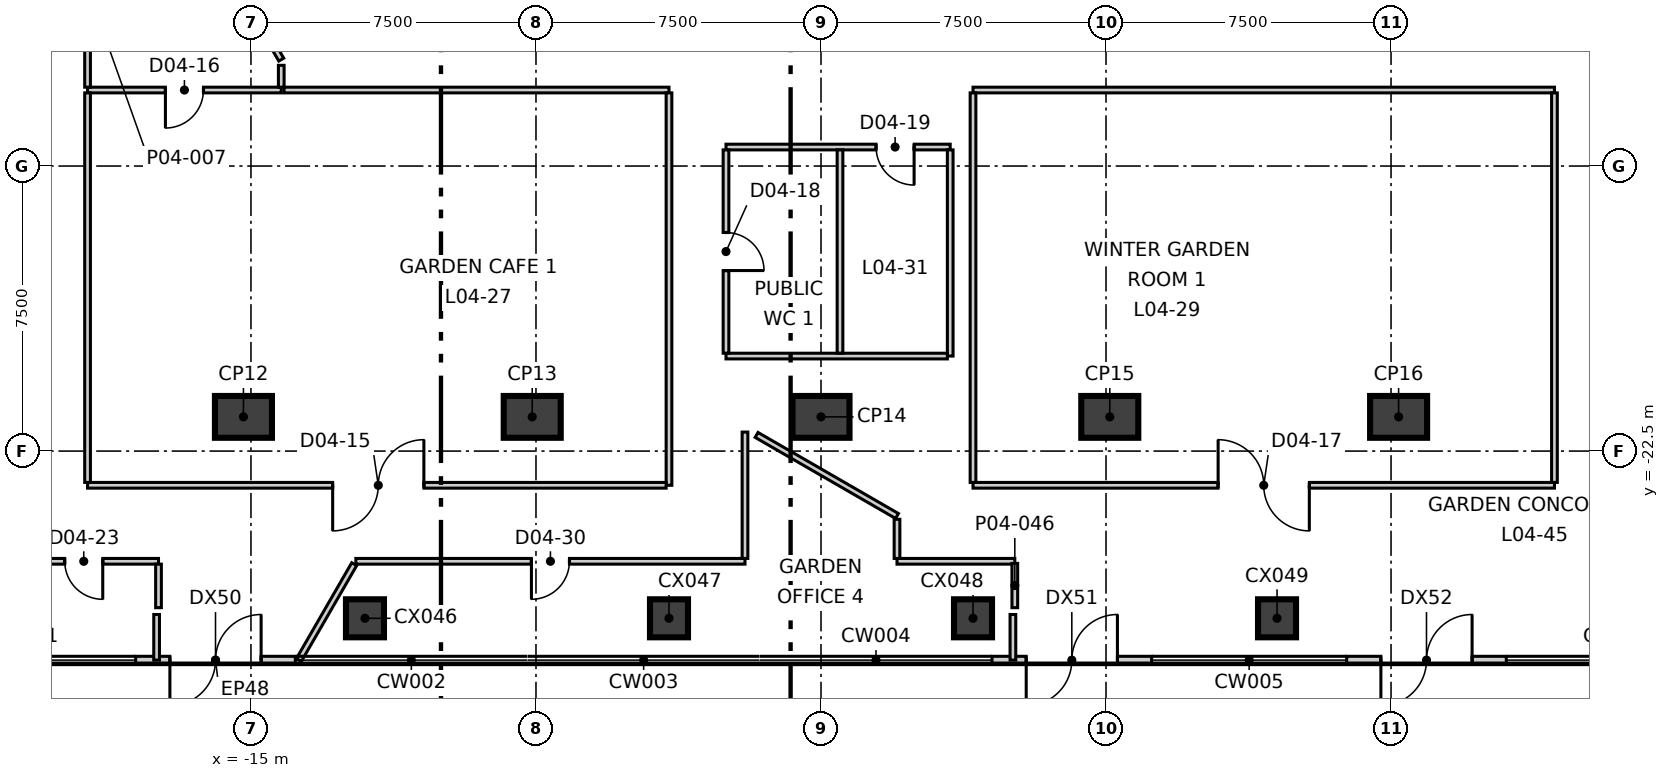
"""IFC4 building model, lengths in metres.
Left out: names, types, materials, properties, quantities, classifications, styles, units other than length and angle.
Written with IfcOpenShell. Run it as: python <this file> out.ifc"""

import sys

from ifc_helpers import new_model, si_unit, direction, frame, frame_2d, origin, origin_2d, place, context, subcontext, project, spatial, rectangle, extrude, element, fill, save


model = new_model("IFC4")
c1 = context("Model", 3, precision=1e-05, world=origin(), true_north=direction((0.0, 1.0)))
c2 = subcontext(c1, "Body", "Model", "MODEL_VIEW")
j1 = project(units=[si_unit("LENGTHUNIT", "METRE"), si_unit("PLANEANGLEUNIT", "RADIAN")], contexts=[c1])
p1 = place(None, origin())
s1 = spatial("IfcSite", under=j1, at=p1, CompositionType="ELEMENT")
p2 = place(p1, origin())
s2 = spatial("IfcBuilding", under=s1, at=p2, CompositionType="ELEMENT")
p3 = place(p2, frame((0.0, 0.0, 25.3)))
s3 = spatial("IfcBuildingStorey", under=s2, at=p3, CompositionType="ELEMENT", Elevation=25.3)
for number, where, z_axis, x_axis in (
    (1, (-15.198, -21.6, -0.4), (0.0, 0.0, 1.0), (1.0, 0.0, 0.0)),
    (2, (-7.599, -21.6, -0.4), (0.0, 0.0, 1.0), (1.0, 0.0, 0.0)),
    (3, (0.0, -21.6, -0.4), (0.0, 0.0, 1.0), (1.0, 0.0, 0.0)),
    (4, (7.599, -21.6, -0.4), (0.0, 0.0, 1.0), (1.0, 0.0, 0.0)),
    (5, (15.199, -21.6, -0.4), (0.0, 0.0, 1.0), (1.0, 0.0, 0.0)),
):
    element("IfcColumn", number, at=place(p3, frame(where, z_axis=z_axis, x_axis=x_axis)), inside=s3, PredefinedType="COLUMN", context=c2, shape_type="SweptSolid", body=[
        extrude(rectangle(XDim=1.5, YDim=1.1, at=origin_2d()), origin(), (0.0, 0.0, 1.0), 5.0),
    ])
for number, where, z_axis, x_axis in (
    (6, (-12.0, -26.9, -0.4), (0.0, 0.0, 1.0), (1.0, 0.0, 0.0)),
    (7, (-4.0, -26.9, -0.4), (0.0, 0.0, 1.0), (1.0, 0.0, 0.0)),
    (8, (4.0, -26.9, -0.4), (0.0, 0.0, 1.0), (1.0, 0.0, 0.0)),
    (9, (12.0, -26.9, -0.4), (0.0, 0.0, 1.0), (1.0, 0.0, 0.0)),
):
    element("IfcColumn", number, at=place(p3, frame(where, z_axis=z_axis, x_axis=x_axis)), inside=s3, PredefinedType="COLUMN", context=c2, shape_type="SweptSolid", body=[
        extrude(rectangle(XDim=1.0, YDim=1.0, at=origin_2d()), origin(), (0.0, 0.0, 1.0), 5.0),
    ])
p4 = place(p3, frame((-18.033, -28.0, 0.0), z_axis=(0.0, 0.0, 1.0), x_axis=(1.0, 0.0, 0.0)))
e10 = element("IfcWall", 10, at=p4, inside=s3, PredefinedType="ELEMENTEDWALL", context=c2, shape_type="SweptSolid", body=[
    extrude(rectangle(XDim=4.2, YDim=0.2, at=frame_2d((2.1, 0.0))), origin(), (0.0, 0.0, 1.0), 4.6),
])
p5 = place(p4, frame((0.9, 0.0, 0.0)))
e11 = element("IfcOpeningElement", 11, at=p5, cuts=e10, PredefinedType="OPENING", context=c2, shape_type="SweptSolid", body=[
    extrude(rectangle(XDim=2.4, YDim=2.4, at=frame_2d((1.2, 1.2))), frame((0.0, 0.11, 0.0), z_axis=(0.0, -1.0, 0.0), x_axis=(1.0, 0.0, 0.0)), (0.0, 0.0, 1.0), 0.22),
])
p6 = place(p3, frame((4.5, -28.0, 0.0), z_axis=(0.0, 0.0, 1.0), x_axis=(1.0, 0.0, 0.0)))
e12 = element("IfcWall", 12, at=p6, inside=s3, PredefinedType="ELEMENTEDWALL", context=c2, shape_type="SweptSolid", body=[
    extrude(rectangle(XDim=4.2, YDim=0.2, at=frame_2d((2.1, 0.0))), origin(), (0.0, 0.0, 1.0), 4.6),
])
p7 = place(p6, frame((0.9, 0.0, 0.0)))
e13 = element("IfcOpeningElement", 13, at=p7, cuts=e12, PredefinedType="OPENING", context=c2, shape_type="SweptSolid", body=[
    extrude(rectangle(XDim=2.4, YDim=2.4, at=frame_2d((1.2, 1.2))), frame((0.0, 0.11, 0.0), z_axis=(0.0, -1.0, 0.0), x_axis=(1.0, 0.0, 0.0)), (0.0, 0.0, 1.0), 0.22),
])
p8 = place(p3, frame((13.833, -28.0, 0.0), z_axis=(0.0, 0.0, 1.0), x_axis=(1.0, 0.0, 0.0)))
e14 = element("IfcWall", 14, at=p8, inside=s3, PredefinedType="ELEMENTEDWALL", context=c2, shape_type="SweptSolid", body=[
    extrude(rectangle(XDim=4.2, YDim=0.2, at=frame_2d((2.1, 0.0))), origin(), (0.0, 0.0, 1.0), 4.6),
])
p9 = place(p8, frame((0.9, 0.0, 0.0)))
e15 = element("IfcOpeningElement", 15, at=p9, cuts=e14, PredefinedType="OPENING", context=c2, shape_type="SweptSolid", body=[
    extrude(rectangle(XDim=2.4, YDim=2.4, at=frame_2d((1.2, 1.2))), frame((0.0, 0.11, 0.0), z_axis=(0.0, -1.0, 0.0), x_axis=(1.0, 0.0, 0.0)), (0.0, 0.0, 1.0), 0.22),
])
p10 = place(p3, frame((-19.3, -13.0, 0.0), z_axis=(0.0, 0.0, 1.0), x_axis=(1.0, 0.0, 0.0)))
e16 = element("IfcWall", 16, at=p10, inside=s3, PredefinedType="PARTITIONING", context=c2, shape_type="SweptSolid", body=[
    extrude(rectangle(XDim=5.097, YDim=0.15, at=frame_2d((2.549, 0.0))), origin(), (0.0, 0.0, 1.0), 4.6),
])
p11 = place(p10, frame((2.049, 0.0, 0.0)))
e17 = element("IfcOpeningElement", 17, at=p11, cuts=e16, PredefinedType="OPENING", context=c2, shape_type="SweptSolid", body=[
    extrude(rectangle(XDim=1.0, YDim=2.1, at=frame_2d((0.5, 1.05))), frame((0.0, 0.085, 0.0), z_axis=(0.0, -1.0, 0.0), x_axis=(1.0, 0.0, 0.0)), (0.0, 0.0, 1.0), 0.17),
])
p12 = place(p3, frame((-19.3, -12.925, 0.0), z_axis=(0.0, 0.0, 1.0), x_axis=(0.0, 1.0, 0.0)))
e18 = element("IfcWall", 18, at=p12, inside=s3, PredefinedType="PARTITIONING", context=c2, shape_type="SweptSolid", body=[
    extrude(rectangle(XDim=5.225, YDim=0.15, at=frame_2d((2.613, 0.0))), origin(), (0.0, 0.0, 1.0), 4.6),
])
p13 = place(p3, frame((-16.801, -7.7, 0.0), z_axis=(0.0, 0.0, 1.0), x_axis=(0.50000986103, -0.866019710441, 0.0)))
e19 = element("IfcWall", 19, at=p13, inside=s3, PredefinedType="PARTITIONING", context=c2, shape_type="SweptSolid", body=[
    extrude(rectangle(XDim=5.196, YDim=0.15, at=frame_2d((2.598, 0.0))), origin(), (0.0, 0.0, 1.0), 4.6),
])
p14 = place(p3, frame((-14.203, -12.925, 0.0), z_axis=(0.0, 0.0, 1.0), x_axis=(0.0, 1.0, 0.0)))
e20 = element("IfcWall", 20, at=p14, inside=s3, PredefinedType="PARTITIONING", context=c2, shape_type="SweptSolid", body=[
    extrude(rectangle(XDim=0.575, YDim=0.15, at=frame_2d((0.288, 0.0))), origin(), (0.0, 0.0, 1.0), 4.6),
])
p15 = place(p3, frame((-21.225, -25.4, 0.0), z_axis=(0.0, 0.0, 1.0), x_axis=(1.0, 0.0, 0.0)))
e21 = element("IfcWall", 21, at=p15, inside=s3, PredefinedType="PARTITIONING", context=c2, shape_type="SweptSolid", body=[
    extrude(rectangle(XDim=3.792, YDim=0.15, at=frame_2d((1.896, 0.0))), origin(), (0.0, 0.0, 1.0), 4.6),
])
p16 = place(p15, frame((1.325, 0.0, 0.0)))
e22 = element("IfcOpeningElement", 22, at=p16, cuts=e21, PredefinedType="OPENING", context=c2, shape_type="SweptSolid", body=[
    extrude(rectangle(XDim=1.0, YDim=2.1, at=frame_2d((0.5, 1.05))), frame((0.0, 0.085, 0.0), z_axis=(0.0, -1.0, 0.0), x_axis=(1.0, 0.0, 0.0)), (0.0, 0.0, 1.0), 0.17),
])
p17 = place(p3, frame((-12.24, -25.4, 0.0), z_axis=(0.0, 0.0, 1.0), x_axis=(1.0, 0.0, 0.0)))
e23 = element("IfcWall", 23, at=p17, inside=s3, PredefinedType="PARTITIONING", context=c2, shape_type="SweptSolid", body=[
    extrude(rectangle(XDim=10.24, YDim=0.15, at=frame_2d((5.12, 0.0))), origin(), (0.0, 0.0, 1.0), 4.6),
])
p18 = place(p17, frame((4.62, 0.0, 0.0)))
e24 = element("IfcOpeningElement", 24, at=p18, cuts=e23, PredefinedType="OPENING", context=c2, shape_type="SweptSolid", body=[
    extrude(rectangle(XDim=1.0, YDim=2.1, at=frame_2d((0.5, 1.05))), frame((0.0, 0.085, 0.0), z_axis=(0.0, -1.0, 0.0), x_axis=(1.0, 0.0, 0.0)), (0.0, 0.0, 1.0), 0.17),
])
p19 = place(p3, frame((2.0, -25.4, 0.0), z_axis=(0.0, 0.0, 1.0), x_axis=(1.0, 0.0, 0.0)))
e25 = element("IfcWall", 25, at=p19, inside=s3, PredefinedType="PARTITIONING", context=c2, shape_type="SweptSolid", body=[
    extrude(rectangle(XDim=3.1, YDim=0.15, at=frame_2d((1.55, 0.0))), origin(), (0.0, 0.0, 1.0), 4.6),
])
p20 = place(p3, frame((-17.433, -26.621, 0.0), z_axis=(0.0, 0.0, 1.0), x_axis=(0.0, 1.0, 0.0)))
e26 = element("IfcWall", 26, at=p20, inside=s3, PredefinedType="PARTITIONING", context=c2, shape_type="SweptSolid", body=[
    extrude(rectangle(XDim=1.146, YDim=0.15, at=frame_2d((0.573, 0.0))), origin(), (0.0, 0.0, 1.0), 4.6),
])
p21 = place(p3, frame((-17.483, -28.0, 0.0), z_axis=(0.0, 0.0, 1.0), x_axis=(0.0, 1.0, 0.0)))
e27 = element("IfcWall", 27, at=p21, inside=s3, PredefinedType="PARTITIONING", context=c2, shape_type="SweptSolid", body=[
    extrude(rectangle(XDim=1.2, YDim=0.15, at=frame_2d((0.6, 0.0))), origin(), (0.0, 0.0, 1.0), 4.6),
])
p22 = place(p3, frame((-14.13, -13.0, 0.0), z_axis=(0.0, 0.0, 1.0), x_axis=(1.0, 0.0, 0.0)))
e28 = element("IfcWall", 28, at=p22, inside=s3, PredefinedType="PARTITIONING", context=c2, shape_type="SweptSolid", body=[
    extrude(rectangle(XDim=10.13, YDim=0.15, at=frame_2d((5.065, 0.0))), origin(), (0.0, 0.0, 1.0), 4.6),
])
p23 = place(p3, frame((4.0, -13.0, 0.0), z_axis=(0.0, 0.0, 1.0), x_axis=(1.0, 0.0, 0.0)))
e29 = element("IfcWall", 29, at=p23, inside=s3, PredefinedType="PARTITIONING", context=c2, shape_type="SweptSolid", body=[
    extrude(rectangle(XDim=15.3, YDim=0.15, at=frame_2d((7.65, 0.0))), origin(), (0.0, 0.0, 1.0), 4.6),
])
p24 = place(p3, frame((-4.0, -23.4, 0.0), z_axis=(0.0, 0.0, 1.0), x_axis=(0.0, 1.0, 0.0)))
e30 = element("IfcWall", 30, at=p24, inside=s3, PredefinedType="PARTITIONING", context=c2, shape_type="SweptSolid", body=[
    extrude(rectangle(XDim=10.325, YDim=0.15, at=frame_2d((5.163, 0.0))), origin(), (0.0, 0.0, 1.0), 3.9),
])
p25 = place(p3, frame((-19.3, -23.4, 0.0), z_axis=(0.0, 0.0, 1.0), x_axis=(1.0, 0.0, 0.0)))
e31 = element("IfcWall", 31, at=p25, inside=s3, PredefinedType="PARTITIONING", context=c2, shape_type="SweptSolid", body=[
    extrude(rectangle(XDim=15.225, YDim=0.15, at=frame_2d((7.613, 0.0))), origin(), (0.0, 0.0, 1.0), 4.6),
])
p26 = place(p25, frame((6.45, 0.0, 0.0)))
e32 = element("IfcOpeningElement", 32, at=p26, cuts=e31, PredefinedType="OPENING", context=c2, shape_type="SweptSolid", body=[
    extrude(rectangle(XDim=2.4, YDim=2.1, at=frame_2d((1.2, 1.05))), frame((0.0, 0.085, 0.0), z_axis=(0.0, -1.0, 0.0), x_axis=(1.0, 0.0, 0.0)), (0.0, 0.0, 1.0), 0.17),
])
p27 = place(p3, frame((4.0, -23.4, 0.0), z_axis=(0.0, 0.0, 1.0), x_axis=(1.0, 0.0, 0.0)))
e33 = element("IfcWall", 33, at=p27, inside=s3, PredefinedType="PARTITIONING", context=c2, shape_type="SweptSolid", body=[
    extrude(rectangle(XDim=15.3, YDim=0.15, at=frame_2d((7.65, 0.0))), origin(), (0.0, 0.0, 1.0), 4.6),
])
p28 = place(p27, frame((6.45, 0.0, 0.0)))
e34 = element("IfcOpeningElement", 34, at=p28, cuts=e33, PredefinedType="OPENING", context=c2, shape_type="SweptSolid", body=[
    extrude(rectangle(XDim=2.4, YDim=2.1, at=frame_2d((1.2, 1.05))), frame((0.0, 0.085, 0.0), z_axis=(0.0, -1.0, 0.0), x_axis=(1.0, 0.0, 0.0)), (0.0, 0.0, 1.0), 0.17),
])
p29 = place(p3, frame((-19.3, -23.325, 0.0), z_axis=(0.0, 0.0, 1.0), x_axis=(0.0, 1.0, 0.0)))
e35 = element("IfcWall", 35, at=p29, inside=s3, PredefinedType="PARTITIONING", context=c2, shape_type="SweptSolid", body=[
    extrude(rectangle(XDim=10.25, YDim=0.15, at=frame_2d((5.125, 0.0))), origin(), (0.0, 0.0, 1.0), 4.6),
])
p30 = place(p3, frame((-13.741, -28.0, 0.0), z_axis=(0.0, 0.0, 1.0), x_axis=(0.500065532695, 0.865987565159, 0.0)))
e36 = element("IfcWall", 36, at=p30, inside=s3, PredefinedType="PARTITIONING", context=c2, shape_type="SweptSolid", body=[
    extrude(rectangle(XDim=2.916, YDim=0.15, at=frame_2d((1.458, 0.0))), origin(), (0.0, 0.0, 1.0), 4.6),
])
p31 = place(p3, frame((-2.0, -25.325, 0.0), z_axis=(0.0, 0.0, 1.0), x_axis=(0.0, 1.0, 0.0)))
e37 = element("IfcWall", 37, at=p31, inside=s3, PredefinedType="PARTITIONING", context=c2, shape_type="SweptSolid", body=[
    extrude(rectangle(XDim=3.325, YDim=0.15, at=frame_2d((1.663, 0.0))), origin(), (0.0, 0.0, 1.0), 4.6),
])
p32 = place(p3, frame((-1.695, -22.075, 0.0), z_axis=(0.0, 0.0, 1.0), x_axis=(0.86605504461, -0.49994865707, 0.0)))
e38 = element("IfcWall", 38, at=p32, inside=s3, PredefinedType="PARTITIONING", context=c2, shape_type="SweptSolid", body=[
    extrude(rectangle(XDim=4.267, YDim=0.15, at=frame_2d((2.133, 0.0))), origin(), (0.0, 0.0, 1.0), 4.6),
])
p33 = place(p3, frame((2.0, -25.325, 0.0), z_axis=(0.0, 0.0, 1.0), x_axis=(0.0, 1.0, 0.0)))
e39 = element("IfcWall", 39, at=p33, inside=s3, PredefinedType="PARTITIONING", context=c2, shape_type="SweptSolid", body=[
    extrude(rectangle(XDim=1.03, YDim=0.15, at=frame_2d((0.515, 0.0))), origin(), (0.0, 0.0, 1.0), 4.6),
])
p34 = place(p3, frame((5.1, -26.621, 0.0), z_axis=(0.0, 0.0, 1.0), x_axis=(0.0, 1.0, 0.0)))
e40 = element("IfcWall", 40, at=p34, inside=s3, PredefinedType="PARTITIONING", context=c2, shape_type="SweptSolid", body=[
    extrude(rectangle(XDim=1.166, YDim=0.15, at=frame_2d((0.583, 0.0))), origin(), (0.0, 0.0, 1.0), 4.6),
])
p35 = place(p3, frame((5.05, -28.0, 0.0), z_axis=(0.0, 0.0, 1.0), x_axis=(0.0, 1.0, 0.0)))
e41 = element("IfcWall", 41, at=p35, inside=s3, PredefinedType="PARTITIONING", context=c2, shape_type="SweptSolid", body=[
    extrude(rectangle(XDim=1.2, YDim=0.15, at=frame_2d((0.6, 0.0))), origin(), (0.0, 0.0, 1.0), 4.6),
])
p36 = place(p3, frame((-2.5, -14.5, 0.0), z_axis=(0.0, 0.0, 1.0), x_axis=(1.0, 0.0, 0.0)))
e42 = element("IfcWall", 42, at=p36, inside=s3, PredefinedType="PARTITIONING", context=c2, shape_type="SweptSolid", body=[
    extrude(rectangle(XDim=5.9, YDim=0.15, at=frame_2d((2.95, 0.0))), origin(), (0.0, 0.0, 1.0), 4.6),
])
p37 = place(p36, frame((3.95, 0.0, 0.0)))
e43 = element("IfcOpeningElement", 43, at=p37, cuts=e42, PredefinedType="OPENING", context=c2, shape_type="SweptSolid", body=[
    extrude(rectangle(XDim=1.0, YDim=2.1, at=frame_2d((0.5, 1.05))), frame((0.0, 0.085, 0.0), z_axis=(0.0, -1.0, 0.0), x_axis=(1.0, 0.0, 0.0)), (0.0, 0.0, 1.0), 0.17),
])
p38 = place(p3, frame((3.4, -20.0, 0.0), z_axis=(0.0, 0.0, 1.0), x_axis=(0.0, 1.0, 0.0)))
e44 = element("IfcWall", 44, at=p38, inside=s3, PredefinedType="PARTITIONING", context=c2, shape_type="SweptSolid", body=[
    extrude(rectangle(XDim=5.425, YDim=0.15, at=frame_2d((2.712, 0.0))), origin(), (0.0, 0.0, 1.0), 4.6),
])
p39 = place(p3, frame((-2.5, -20.0, 0.0), z_axis=(0.0, 0.0, 1.0), x_axis=(1.0, 0.0, 0.0)))
e45 = element("IfcWall", 45, at=p39, inside=s3, PredefinedType="PARTITIONING", context=c2, shape_type="SweptSolid", body=[
    extrude(rectangle(XDim=5.825, YDim=0.15, at=frame_2d((2.913, 0.0))), origin(), (0.0, 0.0, 1.0), 4.6),
])
p40 = place(p3, frame((0.5, -19.925, 0.0), z_axis=(0.0, 0.0, 1.0), x_axis=(0.0, 1.0, 0.0)))
e46 = element("IfcWall", 46, at=p40, inside=s3, PredefinedType="PARTITIONING", context=c2, shape_type="SweptSolid", body=[
    extrude(rectangle(XDim=5.35, YDim=0.15, at=frame_2d((2.675, 0.0))), origin(), (0.0, 0.0, 1.0), 4.1),
])
p41 = place(p3, frame((-2.5, -19.925, 0.0), z_axis=(0.0, 0.0, 1.0), x_axis=(0.0, 1.0, 0.0)))
e47 = element("IfcWall", 47, at=p41, inside=s3, PredefinedType="PARTITIONING", context=c2, shape_type="SweptSolid", body=[
    extrude(rectangle(XDim=5.35, YDim=0.15, at=frame_2d((2.675, 0.0))), origin(), (0.0, 0.0, 1.0), 4.6),
])
p42 = place(p41, frame((2.175, 0.0, 0.0)))
e48 = element("IfcOpeningElement", 48, at=p42, cuts=e47, PredefinedType="OPENING", context=c2, shape_type="SweptSolid", body=[
    extrude(rectangle(XDim=1.0, YDim=2.1, at=frame_2d((0.5, 1.05))), frame((0.0, 0.085, 0.0), z_axis=(0.0, -1.0, 0.0), x_axis=(1.0, 0.0, 0.0)), (0.0, 0.0, 1.0), 0.17),
])
p43 = place(p3, frame((19.3, -23.325, 0.0), z_axis=(0.0, 0.0, 1.0), x_axis=(0.0, 1.0, 0.0)))
e49 = element("IfcWall", 49, at=p43, inside=s3, PredefinedType="PARTITIONING", context=c2, shape_type="SweptSolid", body=[
    extrude(rectangle(XDim=10.25, YDim=0.15, at=frame_2d((5.125, 0.0))), origin(), (0.0, 0.0, 1.0), 4.6),
])
p44 = place(p3, frame((4.0, -23.325, 0.0), z_axis=(0.0, 0.0, 1.0), x_axis=(0.0, 1.0, 0.0)))
e50 = element("IfcWall", 50, at=p44, inside=s3, PredefinedType="PARTITIONING", context=c2, shape_type="SweptSolid", body=[
    extrude(rectangle(XDim=10.25, YDim=0.15, at=frame_2d((5.125, 0.0))), origin(), (0.0, 0.0, 1.0), 3.9),
])
p45 = place(p5, frame((2.4, 0.0, 0.0), z_axis=(0.0, 0.0, 1.0), x_axis=(-1.0, 0.0, 0.0)))
e51 = element("IfcDoor", 51, at=p45, inside=s3, OperationType="DOUBLE_DOOR_SINGLE_SWING", PredefinedType="DOOR", context=c2, shape_type="SweptSolid", body=[
    extrude(rectangle(XDim=2.4, YDim=2.4, at=frame_2d((1.2, 1.2))), frame((0.0, 0.025, 0.0), z_axis=(0.0, -1.0, 0.0), x_axis=(1.0, 0.0, 0.0)), (0.0, 0.0, 1.0), 0.05),
])
fill(e11, e51)
p46 = place(p7, frame((2.4, 0.0, 0.0), z_axis=(0.0, 0.0, 1.0), x_axis=(-1.0, 0.0, 0.0)))
e52 = element("IfcDoor", 52, at=p46, inside=s3, OperationType="DOUBLE_DOOR_SINGLE_SWING", PredefinedType="DOOR", context=c2, shape_type="SweptSolid", body=[
    extrude(rectangle(XDim=2.4, YDim=2.4, at=frame_2d((1.2, 1.2))), frame((0.0, 0.025, 0.0), z_axis=(0.0, -1.0, 0.0), x_axis=(1.0, 0.0, 0.0)), (0.0, 0.0, 1.0), 0.05),
])
fill(e13, e52)
p47 = place(p9, frame((2.4, 0.0, 0.0), z_axis=(0.0, 0.0, 1.0), x_axis=(-1.0, 0.0, 0.0)))
e53 = element("IfcDoor", 53, at=p47, inside=s3, OperationType="DOUBLE_DOOR_SINGLE_SWING", PredefinedType="DOOR", context=c2, shape_type="SweptSolid", body=[
    extrude(rectangle(XDim=2.4, YDim=2.4, at=frame_2d((1.2, 1.2))), frame((0.0, 0.025, 0.0), z_axis=(0.0, -1.0, 0.0), x_axis=(1.0, 0.0, 0.0)), (0.0, 0.0, 1.0), 0.05),
])
fill(e15, e53)
p48 = place(p26, origin())
e54 = element("IfcDoor", 54, at=p48, inside=s3, OperationType="DOUBLE_DOOR_SINGLE_SWING", PredefinedType="DOOR", context=c2, shape_type="SweptSolid", body=[
    extrude(rectangle(XDim=2.4, YDim=2.1, at=frame_2d((1.2, 1.05))), frame((0.0, 0.025, 0.0), z_axis=(0.0, -1.0, 0.0), x_axis=(1.0, 0.0, 0.0)), (0.0, 0.0, 1.0), 0.05),
])
fill(e32, e54)
p49 = place(p11, origin())
e55 = element("IfcDoor", 55, at=p49, inside=s3, OperationType="SINGLE_SWING_LEFT", PredefinedType="DOOR", context=c2, shape_type="SweptSolid", body=[
    extrude(rectangle(XDim=1.0, YDim=2.1, at=frame_2d((0.5, 1.05))), frame((0.0, 0.025, 0.0), z_axis=(0.0, -1.0, 0.0), x_axis=(1.0, 0.0, 0.0)), (0.0, 0.0, 1.0), 0.05),
])
fill(e17, e55)
p50 = place(p28, origin())
e56 = element("IfcDoor", 56, at=p50, inside=s3, OperationType="DOUBLE_DOOR_SINGLE_SWING", PredefinedType="DOOR", context=c2, shape_type="SweptSolid", body=[
    extrude(rectangle(XDim=2.4, YDim=2.1, at=frame_2d((1.2, 1.05))), frame((0.0, 0.025, 0.0), z_axis=(0.0, -1.0, 0.0), x_axis=(1.0, 0.0, 0.0)), (0.0, 0.0, 1.0), 0.05),
])
fill(e34, e56)
p51 = place(p42, origin())
e57 = element("IfcDoor", 57, at=p51, inside=s3, OperationType="SINGLE_SWING_LEFT", PredefinedType="DOOR", context=c2, shape_type="SweptSolid", body=[
    extrude(rectangle(XDim=1.0, YDim=2.1, at=frame_2d((0.5, 1.05))), frame((0.0, 0.025, 0.0), z_axis=(0.0, -1.0, 0.0), x_axis=(1.0, 0.0, 0.0)), (0.0, 0.0, 1.0), 0.05),
])
fill(e48, e57)
p52 = place(p37, origin())
e58 = element("IfcDoor", 58, at=p52, inside=s3, OperationType="SINGLE_SWING_RIGHT", PredefinedType="DOOR", context=c2, shape_type="SweptSolid", body=[
    extrude(rectangle(XDim=1.0, YDim=2.1, at=frame_2d((0.5, 1.05))), frame((0.0, 0.025, 0.0), z_axis=(0.0, -1.0, 0.0), x_axis=(1.0, 0.0, 0.0)), (0.0, 0.0, 1.0), 0.05),
])
fill(e43, e58)
p53 = place(p16, origin())
e59 = element("IfcDoor", 59, at=p53, inside=s3, OperationType="SINGLE_SWING_RIGHT", PredefinedType="DOOR", context=c2, shape_type="SweptSolid", body=[
    extrude(rectangle(XDim=1.0, YDim=2.1, at=frame_2d((0.5, 1.05))), frame((0.0, 0.025, 0.0), z_axis=(0.0, -1.0, 0.0), x_axis=(1.0, 0.0, 0.0)), (0.0, 0.0, 1.0), 0.05),
])
fill(e22, e59)
p54 = place(p18, origin())
e60 = element("IfcDoor", 60, at=p54, inside=s3, OperationType="SINGLE_SWING_LEFT", PredefinedType="DOOR", context=c2, shape_type="SweptSolid", body=[
    extrude(rectangle(XDim=1.0, YDim=2.1, at=frame_2d((0.5, 1.05))), frame((0.0, 0.025, 0.0), z_axis=(0.0, -1.0, 0.0), x_axis=(1.0, 0.0, 0.0)), (0.0, 0.0, 1.0), 0.05),
])
fill(e24, e60)
save(model, sys.argv[1])
